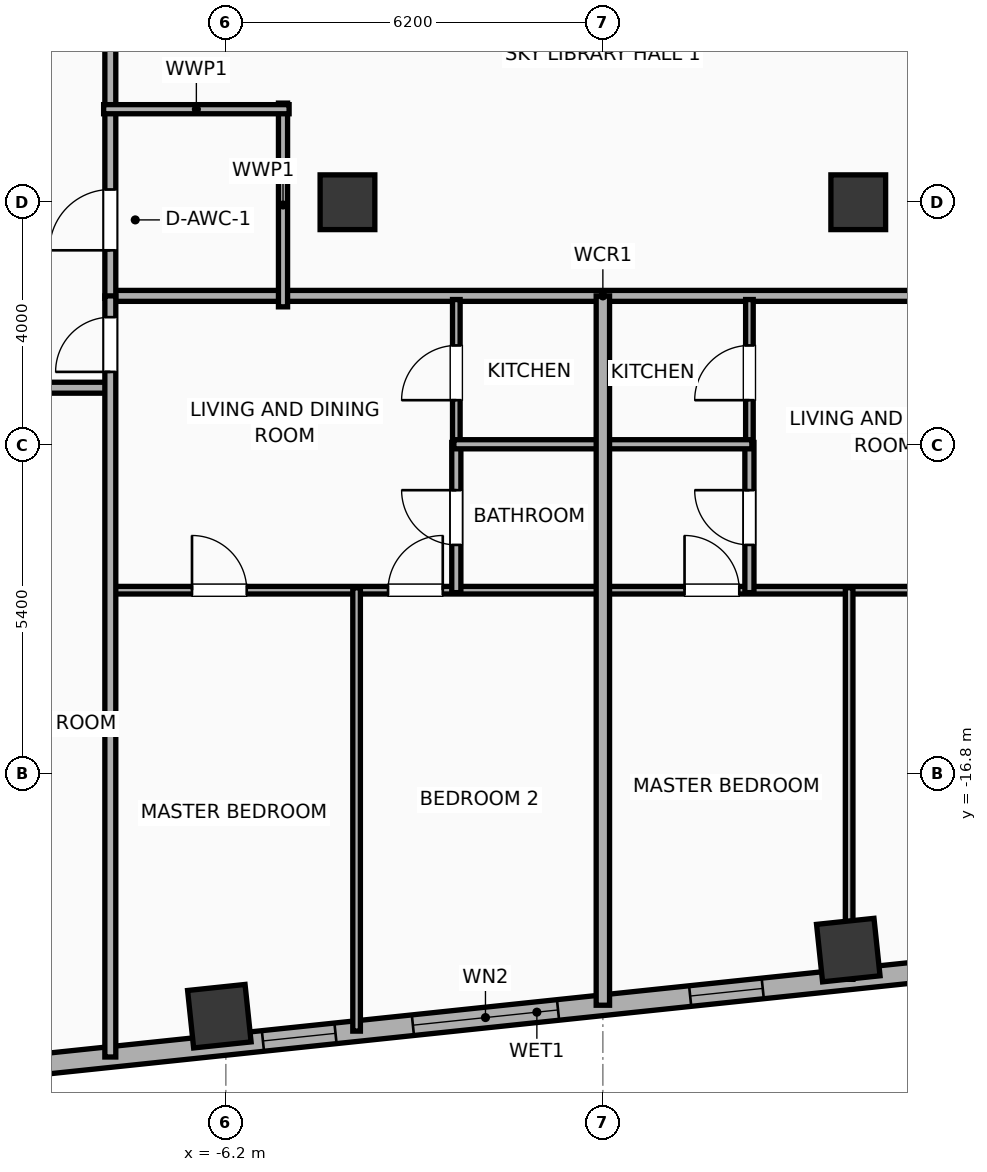
"""IFC4 building model, lengths in metres.
Left out: names, types, materials, properties, quantities, classifications, styles, units other than length and angle.
Written with IfcOpenShell. Run it as: python <this file> out.ifc"""

import sys

from ifc_helpers import new_model, si_unit, direction, frame, frame_2d, origin, origin_2d, place, context, subcontext, project, spatial, rectangle, hollow_rectangle, extrude, element, fill, save


model = new_model("IFC4")
c1 = context("Model", 3, precision=1e-05, world=origin(), true_north=direction((0.0, 1.0)))
c2 = subcontext(c1, "Body", "Model", "MODEL_VIEW")
j1 = project(units=[si_unit("LENGTHUNIT", "METRE"), si_unit("PLANEANGLEUNIT", "RADIAN")], contexts=[c1])
p1 = place(None, origin())
s1 = spatial("IfcSite", under=j1, at=p1, CompositionType="ELEMENT")
p2 = place(p1, origin())
s2 = spatial("IfcBuilding", under=s1, at=p2, CompositionType="ELEMENT")
p3 = place(p2, frame((0.0, 0.0, 156.0)))
s3 = spatial("IfcBuildingStorey", under=s2, at=p3, CompositionType="ELEMENT", Elevation=156.0)
for number, where, z_axis, x_axis in (
    (1, (-4.2, -7.4, 0.0), (0.0, 0.0, 1.0), (1.0, 0.0, 0.0)),
    (2, (4.2, -7.4, 0.0), (0.0, 0.0, 1.0), (1.0, 0.0, 0.0)),
):
    element("IfcColumn", number, at=place(p3, frame(where, z_axis=z_axis, x_axis=x_axis)), inside=s3, PredefinedType="COLUMN", context=c2, shape_type="SweptSolid", body=[
        extrude(rectangle(XDim=0.9, YDim=0.9, at=origin_2d()), origin(), (0.0, 0.0, 1.0), 3.9),
    ])
for number, where, z_axis, x_axis in (
    (3, (-6.307, -20.785, 0.0), (0.0, 0.0, 1.0), (0.995, 0.105, 0.0)),
    (4, (4.036, -19.698, 0.0), (0.0, 0.0, 1.0), (0.995, 0.105, 0.0)),
):
    element("IfcColumn", number, at=place(p3, frame(where, z_axis=z_axis, x_axis=x_axis)), inside=s3, PredefinedType="COLUMN", context=c2, shape_type="SweptSolid", body=[
        extrude(hollow_rectangle(XDim=0.95, YDim=0.95, WallThickness=0.032, at=origin_2d()), origin(), (0.0, 0.0, 1.0), 3.9),
    ])
p4 = place(p3, frame((24.756, -18.003, 0.0), z_axis=(0.0, 0.0, 1.0), x_axis=(-0.99452160744, -0.104531202687, 0.0)))
e5 = element("IfcWall", 5, at=p4, inside=s3, PredefinedType="ELEMENTEDWALL", context=c2, shape_type="SweptSolid", body=[
    extrude(rectangle(XDim=51.967, YDim=0.34, at=frame_2d((25.983, 0.0))), origin(), (0.0, 0.0, 1.0), 3.65),
])
p5 = place(p4, frame((25.633, 0.0, 0.75)))
e6 = element("IfcOpeningElement", 6, at=p5, cuts=e5, PredefinedType="OPENING", context=c2, shape_type="SweptSolid", body=[
    extrude(rectangle(XDim=2.4, YDim=2.1, at=frame_2d((1.2, 1.05))), frame((0.0, 0.18, 0.0), z_axis=(0.0, -1.0, 0.0), x_axis=(1.0, 0.0, 0.0)), (0.0, 0.0, 1.0), 0.36),
])
p6 = place(p4, frame((42.369, 0.0, 0.75)))
e7 = element("IfcOpeningElement", 7, at=p6, cuts=e5, PredefinedType="OPENING", context=c2, shape_type="SweptSolid", body=[
    extrude(rectangle(XDim=1.2, YDim=2.05, at=frame_2d((0.6, 1.025))), frame((0.0, 0.18, 0.0), z_axis=(0.0, -1.0, 0.0), x_axis=(1.0, 0.0, 0.0)), (0.0, 0.0, 1.0), 0.36),
])
p7 = place(p4, frame((34.085, 0.0, 0.75)))
e8 = element("IfcOpeningElement", 8, at=p7, cuts=e5, PredefinedType="OPENING", context=c2, shape_type="SweptSolid", body=[
    extrude(rectangle(XDim=1.2, YDim=2.05, at=frame_2d((0.6, 1.025))), frame((0.0, 0.18, 0.0), z_axis=(0.0, -1.0, 0.0), x_axis=(1.0, 0.0, 0.0)), (0.0, 0.0, 1.0), 0.36),
])
p8 = place(p4, frame((36.993, 0.0, 0.75)))
e9 = element("IfcOpeningElement", 9, at=p8, cuts=e5, PredefinedType="OPENING", context=c2, shape_type="SweptSolid", body=[
    extrude(rectangle(XDim=1.2, YDim=2.05, at=frame_2d((0.6, 1.025))), frame((0.0, 0.18, 0.0), z_axis=(0.0, -1.0, 0.0), x_axis=(1.0, 0.0, 0.0)), (0.0, 0.0, 1.0), 0.36),
])
p9 = place(p4, frame((14.397, 0.0, 0.75)))
e10 = element("IfcOpeningElement", 10, at=p9, cuts=e5, PredefinedType="OPENING", context=c2, shape_type="SweptSolid", body=[
    extrude(rectangle(XDim=1.2, YDim=2.05, at=frame_2d((0.6, 1.025))), frame((0.0, 0.18, 0.0), z_axis=(0.0, -1.0, 0.0), x_axis=(1.0, 0.0, 0.0)), (0.0, 0.0, 1.0), 0.36),
])
p10 = place(p4, frame((11.489, 0.0, 0.75)))
e11 = element("IfcOpeningElement", 11, at=p10, cuts=e5, PredefinedType="OPENING", context=c2, shape_type="SweptSolid", body=[
    extrude(rectangle(XDim=1.2, YDim=2.05, at=frame_2d((0.6, 1.025))), frame((0.0, 0.18, 0.0), z_axis=(0.0, -1.0, 0.0), x_axis=(1.0, 0.0, 0.0)), (0.0, 0.0, 1.0), 0.36),
])
p11 = place(p4, frame((8.521, 0.0, 0.75)))
e12 = element("IfcOpeningElement", 12, at=p11, cuts=e5, PredefinedType="OPENING", context=c2, shape_type="SweptSolid", body=[
    extrude(rectangle(XDim=1.2, YDim=2.05, at=frame_2d((0.6, 1.025))), frame((0.0, 0.18, 0.0), z_axis=(0.0, -1.0, 0.0), x_axis=(1.0, 0.0, 0.0)), (0.0, 0.0, 1.0), 0.36),
])
p12 = place(p4, frame((5.582, 0.0, 0.75)))
e13 = element("IfcOpeningElement", 13, at=p12, cuts=e5, PredefinedType="OPENING", context=c2, shape_type="SweptSolid", body=[
    extrude(rectangle(XDim=1.2, YDim=2.05, at=frame_2d((0.6, 1.025))), frame((0.0, 0.18, 0.0), z_axis=(0.0, -1.0, 0.0), x_axis=(1.0, 0.0, 0.0)), (0.0, 0.0, 1.0), 0.36),
])
p13 = place(p4, frame((29.313, 0.0, 0.75)))
e14 = element("IfcOpeningElement", 14, at=p13, cuts=e5, PredefinedType="OPENING", context=c2, shape_type="SweptSolid", body=[
    extrude(rectangle(XDim=1.2, YDim=2.05, at=frame_2d((0.6, 1.025))), frame((0.0, 0.18, 0.0), z_axis=(0.0, -1.0, 0.0), x_axis=(1.0, 0.0, 0.0)), (0.0, 0.0, 1.0), 0.36),
])
p14 = place(p4, frame((22.248, 0.0, 0.75)))
e15 = element("IfcOpeningElement", 15, at=p14, cuts=e5, PredefinedType="OPENING", context=c2, shape_type="SweptSolid", body=[
    extrude(rectangle(XDim=1.2, YDim=2.05, at=frame_2d((0.6, 1.025))), frame((0.0, 0.18, 0.0), z_axis=(0.0, -1.0, 0.0), x_axis=(1.0, 0.0, 0.0)), (0.0, 0.0, 1.0), 0.36),
])
p15 = place(p4, frame((18.186, 0.0, 0.75)))
e16 = element("IfcOpeningElement", 16, at=p15, cuts=e5, PredefinedType="OPENING", context=c2, shape_type="SweptSolid", body=[
    extrude(rectangle(XDim=1.2, YDim=2.05, at=frame_2d((0.6, 1.025))), frame((0.0, 0.18, 0.0), z_axis=(0.0, -1.0, 0.0), x_axis=(1.0, 0.0, 0.0)), (0.0, 0.0, 1.0), 0.36),
])
p16 = place(p4, frame((47.879, 0.0, 0.75)))
e17 = element("IfcOpeningElement", 17, at=p16, cuts=e5, PredefinedType="OPENING", context=c2, shape_type="SweptSolid", body=[
    extrude(rectangle(XDim=1.2, YDim=2.05, at=frame_2d((0.6, 1.025))), frame((0.0, 0.18, 0.0), z_axis=(0.0, -1.0, 0.0), x_axis=(1.0, 0.0, 0.0)), (0.0, 0.0, 1.0), 0.36),
])
p17 = place(p4, frame((49.844, 0.0, 0.75)))
e18 = element("IfcOpeningElement", 18, at=p17, cuts=e5, PredefinedType="OPENING", context=c2, shape_type="SweptSolid", body=[
    extrude(rectangle(XDim=1.2, YDim=2.05, at=frame_2d((0.6, 1.025))), frame((0.0, 0.18, 0.0), z_axis=(0.0, -1.0, 0.0), x_axis=(1.0, 0.0, 0.0)), (0.0, 0.0, 1.0), 0.36),
])
p18 = place(p3, frame((-8.15, -8.94, 0.0), z_axis=(0.0, 0.0, 1.0), x_axis=(1.0, 0.0, 0.0)))
e19 = element("IfcWall", 19, at=p18, inside=s3, PredefinedType="PARTITIONING", context=c2, shape_type="SweptSolid", body=[
    extrude(rectangle(XDim=16.3, YDim=0.18, at=frame_2d((8.15, 0.0))), origin(), (0.0, 0.0, 1.0), 3.65),
])
p19 = place(p3, frame((-8.1, -8.98, 0.0), z_axis=(0.0, 0.0, 1.0), x_axis=(0.0, 1.0, 0.0)))
e20 = element("IfcWall", 20, at=p19, inside=s3, PredefinedType="PARTITIONING", context=c2, shape_type="SweptSolid", body=[
    extrude(rectangle(XDim=8.06, YDim=0.18, at=frame_2d((4.03, 0.0))), origin(), (0.0, 0.0, 1.0), 3.65),
])
p20 = place(p19, frame((0.79, 0.0, 0.0)))
e21 = element("IfcOpeningElement", 21, at=p20, cuts=e20, PredefinedType="OPENING", context=c2, shape_type="SweptSolid", body=[
    extrude(rectangle(XDim=1.0, YDim=2.05, at=frame_2d((0.5, 1.025))), frame((0.0, 0.1, 0.0), z_axis=(0.0, -1.0, 0.0), x_axis=(1.0, 0.0, 0.0)), (0.0, 0.0, 1.0), 0.2),
])
p21 = place(p3, frame((-5.26, -9.12, 0.0), z_axis=(0.0, 0.0, 1.0), x_axis=(0.0, 1.0, 0.0)))
e22 = element("IfcWall", 22, at=p21, inside=s3, PredefinedType="PLUMBINGWALL", context=c2, shape_type="SweptSolid", body=[
    extrude(rectangle(XDim=3.35, YDim=0.15, at=frame_2d((1.675, 0.0))), origin(), (0.0, 0.0, 1.0), 3.65),
])
p22 = place(p3, frame((-8.21, -5.87, 0.0), z_axis=(0.0, 0.0, 1.0), x_axis=(1.0, 0.0, 0.0)))
e23 = element("IfcWall", 23, at=p22, inside=s3, PredefinedType="PLUMBINGWALL", context=c2, shape_type="SweptSolid", body=[
    extrude(rectangle(XDim=3.05, YDim=0.15, at=frame_2d((1.525, 0.0))), origin(), (0.0, 0.0, 1.0), 3.65),
])
p23 = place(p3, frame((-19.75, -10.45, 0.0), z_axis=(0.0, 0.0, 1.0), x_axis=(1.0, 0.0, 0.0)))
e24 = element("IfcWall", 24, at=p23, inside=s3, PredefinedType="PARTITIONING", context=c2, shape_type="SweptSolid", body=[
    extrude(rectangle(XDim=11.67, YDim=0.18, at=frame_2d((5.835, 0.0))), origin(), (0.0, 0.0, 1.0), 3.65),
])
p24 = place(p23, frame((2.664, 0.0, 0.0)))
e25 = element("IfcOpeningElement", 25, at=p24, cuts=e24, PredefinedType="OPENING", context=c2, shape_type="SweptSolid", body=[
    extrude(rectangle(XDim=0.9, YDim=2.05, at=frame_2d((0.45, 1.025))), frame((0.0, 0.1, 0.0), z_axis=(0.0, -1.0, 0.0), x_axis=(1.0, 0.0, 0.0)), (0.0, 0.0, 1.0), 0.2),
])
p25 = place(p23, frame((9.404, 0.0, 0.0)))
e26 = element("IfcOpeningElement", 26, at=p25, cuts=e24, PredefinedType="OPENING", context=c2, shape_type="SweptSolid", body=[
    extrude(rectangle(XDim=1.15, YDim=2.05, at=frame_2d((0.575, 1.025))), frame((0.0, 0.1, 0.0), z_axis=(0.0, -1.0, 0.0), x_axis=(1.0, 0.0, 0.0)), (0.0, 0.0, 1.0), 0.2),
])
p26 = place(p3, frame((-8.08, -13.78, 0.0), z_axis=(0.0, 0.0, 1.0), x_axis=(1.0, 0.0, 0.0)))
e27 = element("IfcWall", 27, at=p26, inside=s3, PredefinedType="PARTITIONING", context=c2, shape_type="SweptSolid", body=[
    extrude(rectangle(XDim=8.06, YDim=0.125, at=frame_2d((4.03, 0.0))), origin(), (0.0, 0.0, 1.0), 3.65),
])
p27 = place(p26, frame((1.323, 0.0, 0.0)))
e28 = element("IfcOpeningElement", 28, at=p27, cuts=e27, PredefinedType="OPENING", context=c2, shape_type="SweptSolid", body=[
    extrude(rectangle(XDim=0.9, YDim=2.05, at=frame_2d((0.45, 1.025))), frame((0.0, 0.073, 0.0), z_axis=(0.0, -1.0, 0.0), x_axis=(1.0, 0.0, 0.0)), (0.0, 0.0, 1.0), 0.145),
])
p28 = place(p26, frame((4.547, 0.0, 0.0)))
e29 = element("IfcOpeningElement", 29, at=p28, cuts=e27, PredefinedType="OPENING", context=c2, shape_type="SweptSolid", body=[
    extrude(rectangle(XDim=0.9, YDim=2.05, at=frame_2d((0.45, 1.025))), frame((0.0, 0.073, 0.0), z_axis=(0.0, -1.0, 0.0), x_axis=(1.0, 0.0, 0.0)), (0.0, 0.0, 1.0), 0.145),
])
p29 = place(p3, frame((-2.41, -11.41, 0.0), z_axis=(0.0, 0.0, 1.0), x_axis=(0.0, 1.0, 0.0)))
e30 = element("IfcWall", 30, at=p29, inside=s3, PredefinedType="PARTITIONING", context=c2, shape_type="SweptSolid", body=[
    extrude(rectangle(XDim=2.41, YDim=0.125, at=frame_2d((1.205, 0.0))), origin(), (0.0, 0.0, 1.0), 3.65),
])
p30 = place(p29, frame((0.755, 0.0, 0.0)))
e31 = element("IfcOpeningElement", 31, at=p30, cuts=e30, PredefinedType="OPENING", context=c2, shape_type="SweptSolid", body=[
    extrude(rectangle(XDim=0.9, YDim=2.05, at=frame_2d((0.45, 1.025))), frame((0.0, 0.073, 0.0), z_axis=(0.0, -1.0, 0.0), x_axis=(1.0, 0.0, 0.0)), (0.0, 0.0, 1.0), 0.145),
])
p31 = place(p3, frame((-2.41, -13.82, 0.0), z_axis=(0.0, 0.0, 1.0), x_axis=(0.0, 1.0, 0.0)))
e32 = element("IfcWall", 32, at=p31, inside=s3, PredefinedType="PLUMBINGWALL", context=c2, shape_type="SweptSolid", body=[
    extrude(rectangle(XDim=2.47, YDim=0.15, at=frame_2d((1.235, 0.0))), origin(), (0.0, 0.0, 1.0), 3.65),
])
p32 = place(p31, frame((0.785, 0.0, 0.0)))
e33 = element("IfcOpeningElement", 33, at=p32, cuts=e32, PredefinedType="OPENING", context=c2, shape_type="SweptSolid", body=[
    extrude(rectangle(XDim=0.9, YDim=2.05, at=frame_2d((0.45, 1.025))), frame((0.0, 0.085, 0.0), z_axis=(0.0, -1.0, 0.0), x_axis=(1.0, 0.0, 0.0)), (0.0, 0.0, 1.0), 0.17),
])
p33 = place(p3, frame((-2.45, -11.38, 0.0), z_axis=(0.0, 0.0, 1.0), x_axis=(1.0, 0.0, 0.0)))
e34 = element("IfcWall", 34, at=p33, inside=s3, PredefinedType="PLUMBINGWALL", context=c2, shape_type="SweptSolid", body=[
    extrude(rectangle(XDim=2.43, YDim=0.15, at=frame_2d((1.215, 0.0))), origin(), (0.0, 0.0, 1.0), 3.65),
])
p34 = place(p3, frame((-4.05, -21.031, 0.0), z_axis=(0.0, 0.0, 1.0), x_axis=(0.0, 1.0, 0.0)))
e35 = element("IfcWall", 35, at=p34, inside=s3, PredefinedType="PARTITIONING", context=c2, shape_type="SweptSolid", body=[
    extrude(rectangle(XDim=7.291, YDim=0.125, at=frame_2d((3.646, 0.0))), origin(), (0.0, 0.0, 1.0), 3.65),
])
p35 = place(p3, frame((-8.1, -21.456, 0.0), z_axis=(0.0, 0.0, 1.0), x_axis=(0.0, 1.0, 0.0)))
e36 = element("IfcWall", 36, at=p35, inside=s3, PredefinedType="PARTITIONING", context=c2, shape_type="SweptSolid", body=[
    extrude(rectangle(XDim=12.516, YDim=0.18, at=frame_2d((6.258, 0.0))), origin(), (0.0, 0.0, 1.0), 3.65),
])
p36 = place(p35, frame((11.267, 0.0, 0.0)))
e37 = element("IfcOpeningElement", 37, at=p36, cuts=e36, PredefinedType="OPENING", context=c2, shape_type="SweptSolid", body=[
    extrude(rectangle(XDim=0.9, YDim=2.05, at=frame_2d((0.45, 1.025))), frame((0.0, 0.1, 0.0), z_axis=(0.0, -1.0, 0.0), x_axis=(1.0, 0.0, 0.0)), (0.0, 0.0, 1.0), 0.2),
])
p37 = place(p3, frame((0.02, -13.78, 0.0), z_axis=(0.0, 0.0, 1.0), x_axis=(1.0, 0.0, 0.0)))
e38 = element("IfcWall", 38, at=p37, inside=s3, PredefinedType="PARTITIONING", context=c2, shape_type="SweptSolid", body=[
    extrude(rectangle(XDim=8.06, YDim=0.125, at=frame_2d((4.03, 0.0))), origin(), (0.0, 0.0, 1.0), 3.65),
])
p38 = place(p37, frame((1.323, 0.0, 0.0)))
e39 = element("IfcOpeningElement", 39, at=p38, cuts=e38, PredefinedType="OPENING", context=c2, shape_type="SweptSolid", body=[
    extrude(rectangle(XDim=0.9, YDim=2.05, at=frame_2d((0.45, 1.025))), frame((0.0, 0.073, 0.0), z_axis=(0.0, -1.0, 0.0), x_axis=(1.0, 0.0, 0.0)), (0.0, 0.0, 1.0), 0.145),
])
p39 = place(p37, frame((5.837, 0.0, 0.0)))
e40 = element("IfcOpeningElement", 40, at=p39, cuts=e38, PredefinedType="OPENING", context=c2, shape_type="SweptSolid", body=[
    extrude(rectangle(XDim=0.9, YDim=2.05, at=frame_2d((0.45, 1.025))), frame((0.0, 0.073, 0.0), z_axis=(0.0, -1.0, 0.0), x_axis=(1.0, 0.0, 0.0)), (0.0, 0.0, 1.0), 0.145),
])
p40 = place(p3, frame((2.41, -11.41, 0.0), z_axis=(0.0, 0.0, 1.0), x_axis=(0.0, 1.0, 0.0)))
e41 = element("IfcWall", 41, at=p40, inside=s3, PredefinedType="PARTITIONING", context=c2, shape_type="SweptSolid", body=[
    extrude(rectangle(XDim=2.41, YDim=0.125, at=frame_2d((1.205, 0.0))), origin(), (0.0, 0.0, 1.0), 3.65),
])
p41 = place(p40, frame((0.755, 0.0, 0.0)))
e42 = element("IfcOpeningElement", 42, at=p41, cuts=e41, PredefinedType="OPENING", context=c2, shape_type="SweptSolid", body=[
    extrude(rectangle(XDim=0.9, YDim=2.05, at=frame_2d((0.45, 1.025))), frame((0.0, 0.073, 0.0), z_axis=(0.0, -1.0, 0.0), x_axis=(1.0, 0.0, 0.0)), (0.0, 0.0, 1.0), 0.145),
])
p42 = place(p3, frame((2.41, -13.82, 0.0), z_axis=(0.0, 0.0, 1.0), x_axis=(0.0, 1.0, 0.0)))
e43 = element("IfcWall", 43, at=p42, inside=s3, PredefinedType="PLUMBINGWALL", context=c2, shape_type="SweptSolid", body=[
    extrude(rectangle(XDim=2.47, YDim=0.15, at=frame_2d((1.235, 0.0))), origin(), (0.0, 0.0, 1.0), 3.65),
])
p43 = place(p42, frame((0.785, 0.0, 0.0)))
e44 = element("IfcOpeningElement", 44, at=p43, cuts=e43, PredefinedType="OPENING", context=c2, shape_type="SweptSolid", body=[
    extrude(rectangle(XDim=0.9, YDim=2.05, at=frame_2d((0.45, 1.025))), frame((0.0, 0.085, 0.0), z_axis=(0.0, -1.0, 0.0), x_axis=(1.0, 0.0, 0.0)), (0.0, 0.0, 1.0), 0.17),
])
p44 = place(p3, frame((0.02, -11.38, 0.0), z_axis=(0.0, 0.0, 1.0), x_axis=(1.0, 0.0, 0.0)))
e45 = element("IfcWall", 45, at=p44, inside=s3, PredefinedType="PLUMBINGWALL", context=c2, shape_type="SweptSolid", body=[
    extrude(rectangle(XDim=2.43, YDim=0.15, at=frame_2d((1.215, 0.0))), origin(), (0.0, 0.0, 1.0), 3.65),
])
p45 = place(p3, frame((4.05, -20.179, 0.0), z_axis=(0.0, 0.0, 1.0), x_axis=(0.0, 1.0, 0.0)))
e46 = element("IfcWall", 46, at=p45, inside=s3, PredefinedType="PARTITIONING", context=c2, shape_type="SweptSolid", body=[
    extrude(rectangle(XDim=6.439, YDim=0.125, at=frame_2d((3.22, 0.0))), origin(), (0.0, 0.0, 1.0), 3.04),
])
p46 = place(p3, frame((0.0, -20.605, 0.0), z_axis=(0.0, 0.0, 1.0), x_axis=(0.0, 1.0, 0.0)))
e47 = element("IfcWall", 47, at=p46, inside=s3, PredefinedType="PARTITIONING", context=c2, shape_type="SweptSolid", body=[
    extrude(rectangle(XDim=11.665, YDim=0.22, at=frame_2d((5.833, 0.0))), origin(), (0.0, 0.0, 1.0), 3.65),
])
p47 = place(p5, origin())
e48 = element("IfcWindow", 48, at=p47, inside=s3, PartitioningType="SINGLE_PANEL", PredefinedType="WINDOW", context=c2, shape_type="SweptSolid", body=[
    extrude(rectangle(XDim=2.4, YDim=2.1, at=frame_2d((1.2, 1.05))), frame((0.0, 0.03, 0.0), z_axis=(0.0, -1.0, 0.0), x_axis=(1.0, 0.0, 0.0)), (0.0, 0.0, 1.0), 0.06),
])
fill(e6, e48)
p48 = place(p13, origin())
e49 = element("IfcWindow", 49, at=p48, inside=s3, PartitioningType="SINGLE_PANEL", PredefinedType="WINDOW", context=c2, shape_type="SweptSolid", body=[
    extrude(rectangle(XDim=1.2, YDim=2.05, at=frame_2d((0.6, 1.025))), frame((0.0, 0.03, 0.0), z_axis=(0.0, -1.0, 0.0), x_axis=(1.0, 0.0, 0.0)), (0.0, 0.0, 1.0), 0.06),
])
fill(e14, e49)
p49 = place(p14, origin())
e50 = element("IfcWindow", 50, at=p49, inside=s3, PartitioningType="SINGLE_PANEL", PredefinedType="WINDOW", context=c2, shape_type="SweptSolid", body=[
    extrude(rectangle(XDim=1.2, YDim=2.05, at=frame_2d((0.6, 1.025))), frame((0.0, 0.03, 0.0), z_axis=(0.0, -1.0, 0.0), x_axis=(1.0, 0.0, 0.0)), (0.0, 0.0, 1.0), 0.06),
])
fill(e15, e50)
p50 = place(p20, origin())
e51 = element("IfcDoor", 51, at=p50, inside=s3, OperationType="SINGLE_SWING_LEFT", PredefinedType="DOOR", context=c2, shape_type="SweptSolid", body=[
    extrude(rectangle(XDim=1.0, YDim=2.05, at=frame_2d((0.5, 1.025))), frame((0.0, 0.025, 0.0), z_axis=(0.0, -1.0, 0.0), x_axis=(1.0, 0.0, 0.0)), (0.0, 0.0, 1.0), 0.05),
])
fill(e21, e51)
p51 = place(p27, origin())
e52 = element("IfcDoor", 52, at=p51, inside=s3, OperationType="SINGLE_SWING_LEFT", PredefinedType="DOOR", context=c2, shape_type="SweptSolid", body=[
    extrude(rectangle(XDim=0.9, YDim=2.05, at=frame_2d((0.45, 1.025))), frame((0.0, 0.025, 0.0), z_axis=(0.0, -1.0, 0.0), x_axis=(1.0, 0.0, 0.0)), (0.0, 0.0, 1.0), 0.05),
])
fill(e28, e52)
p52 = place(p28, origin())
e53 = element("IfcDoor", 53, at=p52, inside=s3, OperationType="SINGLE_SWING_RIGHT", PredefinedType="DOOR", context=c2, shape_type="SweptSolid", body=[
    extrude(rectangle(XDim=0.9, YDim=2.05, at=frame_2d((0.45, 1.025))), frame((0.0, 0.025, 0.0), z_axis=(0.0, -1.0, 0.0), x_axis=(1.0, 0.0, 0.0)), (0.0, 0.0, 1.0), 0.05),
])
fill(e29, e53)
p53 = place(p30, origin())
e54 = element("IfcDoor", 54, at=p53, inside=s3, OperationType="SINGLE_SWING_LEFT", PredefinedType="DOOR", context=c2, shape_type="SweptSolid", body=[
    extrude(rectangle(XDim=0.9, YDim=2.05, at=frame_2d((0.45, 1.025))), frame((0.0, 0.025, 0.0), z_axis=(0.0, -1.0, 0.0), x_axis=(1.0, 0.0, 0.0)), (0.0, 0.0, 1.0), 0.05),
])
fill(e31, e54)
p54 = place(p32, origin())
e55 = element("IfcDoor", 55, at=p54, inside=s3, OperationType="SINGLE_SWING_RIGHT", PredefinedType="DOOR", context=c2, shape_type="SweptSolid", body=[
    extrude(rectangle(XDim=0.9, YDim=2.05, at=frame_2d((0.45, 1.025))), frame((0.0, 0.025, 0.0), z_axis=(0.0, -1.0, 0.0), x_axis=(1.0, 0.0, 0.0)), (0.0, 0.0, 1.0), 0.05),
])
fill(e33, e55)
p55 = place(p36, origin())
e56 = element("IfcDoor", 56, at=p55, inside=s3, OperationType="SINGLE_SWING_LEFT", PredefinedType="DOOR", context=c2, shape_type="SweptSolid", body=[
    extrude(rectangle(XDim=0.9, YDim=2.05, at=frame_2d((0.45, 1.025))), frame((0.0, 0.025, 0.0), z_axis=(0.0, -1.0, 0.0), x_axis=(1.0, 0.0, 0.0)), (0.0, 0.0, 1.0), 0.05),
])
fill(e37, e56)
p56 = place(p38, origin())
e57 = element("IfcDoor", 57, at=p56, inside=s3, OperationType="SINGLE_SWING_LEFT", PredefinedType="DOOR", context=c2, shape_type="SweptSolid", body=[
    extrude(rectangle(XDim=0.9, YDim=2.05, at=frame_2d((0.45, 1.025))), frame((0.0, 0.025, 0.0), z_axis=(0.0, -1.0, 0.0), x_axis=(1.0, 0.0, 0.0)), (0.0, 0.0, 1.0), 0.05),
])
fill(e39, e57)
p57 = place(p41, origin())
e58 = element("IfcDoor", 58, at=p57, inside=s3, OperationType="SINGLE_SWING_LEFT", PredefinedType="DOOR", context=c2, shape_type="SweptSolid", body=[
    extrude(rectangle(XDim=0.9, YDim=2.05, at=frame_2d((0.45, 1.025))), frame((0.0, 0.025, 0.0), z_axis=(0.0, -1.0, 0.0), x_axis=(1.0, 0.0, 0.0)), (0.0, 0.0, 1.0), 0.05),
])
fill(e42, e58)
p58 = place(p43, origin())
e59 = element("IfcDoor", 59, at=p58, inside=s3, OperationType="SINGLE_SWING_RIGHT", PredefinedType="DOOR", context=c2, shape_type="SweptSolid", body=[
    extrude(rectangle(XDim=0.9, YDim=2.05, at=frame_2d((0.45, 1.025))), frame((0.0, 0.025, 0.0), z_axis=(0.0, -1.0, 0.0), x_axis=(1.0, 0.0, 0.0)), (0.0, 0.0, 1.0), 0.05),
])
fill(e44, e59)
save(model, sys.argv[1])
